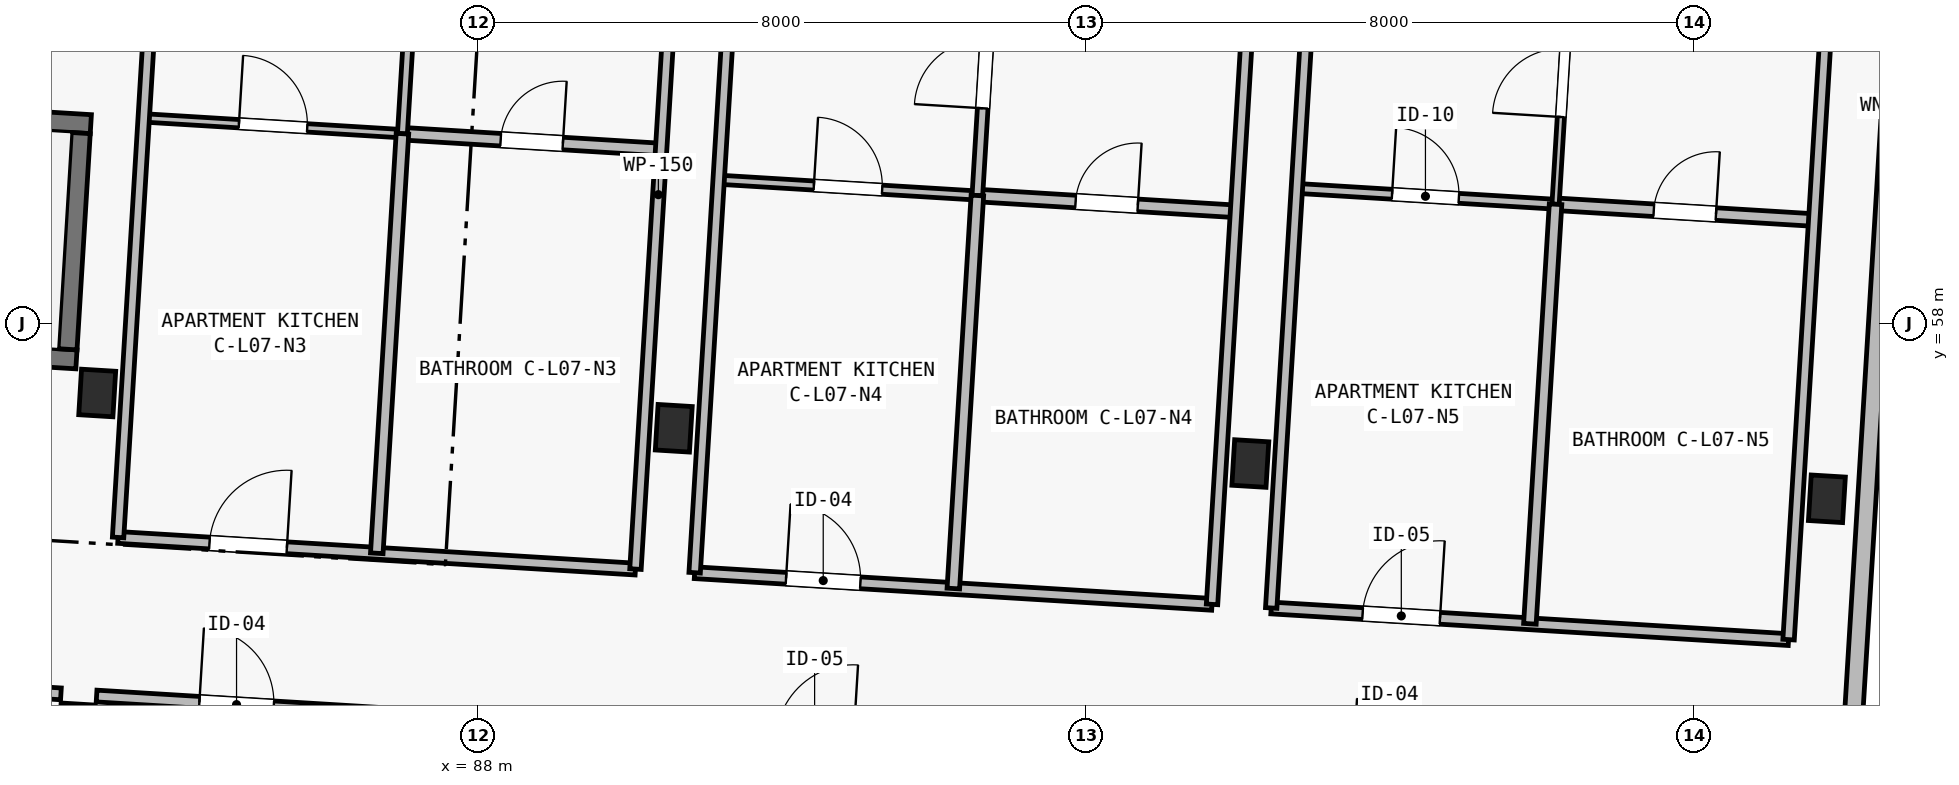
"""IFC4 building model, lengths in metres.
Left out: names, types, materials, properties, quantities, classifications, styles, units other than length and angle.
Written with IfcOpenShell. Run it as: python <this file> out.ifc"""

import sys

from ifc_helpers import new_model, si_unit, direction, frame, frame_2d, origin, origin_2d, place, context, subcontext, project, spatial, rectangle, extrude, element, fill, save


model = new_model("IFC4")
c1 = context("Model", 3, precision=1e-05, world=origin(), true_north=direction((0.0, 1.0)))
c2 = subcontext(c1, "Body", "Model", "MODEL_VIEW")
j1 = project(units=[si_unit("LENGTHUNIT", "METRE"), si_unit("PLANEANGLEUNIT", "RADIAN")], contexts=[c1])
p1 = place(None, origin())
s1 = spatial("IfcSite", under=j1, at=p1, CompositionType="ELEMENT")
p2 = place(p1, origin())
s2 = spatial("IfcBuilding", under=s1, at=p2, CompositionType="ELEMENT")
p3 = place(p2, frame((0.0, 0.0, 24.65)))
s3 = spatial("IfcBuildingStorey", under=s2, at=p3, CompositionType="ELEMENT", Elevation=24.65)
for number, where, z_axis, x_axis in (
    (1, (82.721, 52.694, 0.0), (0.0, 0.0, 1.0), (0.998, -0.061, 0.0)),
    (2, (82.99, 57.086, 0.0), (0.0, 0.0, 1.0), (0.998, -0.061, 0.0)),
    (3, (90.576, 56.622, 0.0), (0.0, 0.0, 1.0), (0.998, -0.061, 0.0)),
    (4, (98.162, 56.158, 0.0), (0.0, 0.0, 1.0), (0.998, -0.061, 0.0)),
):
    element("IfcColumn", number, at=place(p3, frame(where, z_axis=z_axis, x_axis=x_axis)), inside=s3, PredefinedType="COLUMN", context=c2, shape_type="SweptSolid", body=[
        extrude(rectangle(XDim=0.45, YDim=0.6, at=origin_2d()), origin(), (0.0, 0.0, 1.0), 3.25),
    ])
p4 = place(p3, frame((105.748, 55.694, 0.0), z_axis=(0.0, 0.0, 1.0), x_axis=(0.998134798422, -0.061048539535, 0.0)))
e5 = element("IfcColumn", 5, at=p4, inside=s3, PredefinedType="COLUMN", context=c2, shape_type="SweptSolid", body=[
    extrude(rectangle(XDim=0.45, YDim=0.6, at=origin_2d()), origin(), (0.0, 0.0, 1.0), 4.701),
])
p5 = place(p3, frame((75.919, 61.05, 0.0), z_axis=(0.0, 0.0, 1.0), x_axis=(0.998135546153, -0.061036313012, 0.0)))
e6 = element("IfcWall", 6, at=p5, inside=s3, PredefinedType="SHEAR", context=c2, shape_type="SweptSolid", body=[
    extrude(rectangle(XDim=7.0, YDim=0.25, at=frame_2d((3.5, 0.0))), origin(), (0.0, 0.0, 1.0), 3.25),
])
p6 = place(p5, frame((0.45, 0.0, 0.0)))
e7 = element("IfcOpeningElement", 7, at=p6, cuts=e6, PredefinedType="OPENING", context=c2, shape_type="SweptSolid", body=[
    extrude(rectangle(XDim=0.9, YDim=2.1, at=frame_2d((0.45, 1.05))), frame((0.0, 0.14, 0.0), z_axis=(0.0, -1.0, 0.0), x_axis=(1.0, 0.0, 0.0)), (0.0, 0.0, 1.0), 0.28),
])
p7 = place(p3, frame((75.73, 57.956, 0.0), z_axis=(0.0, 0.0, 1.0), x_axis=(0.998135546153, -0.061036313012, 0.0)))
e8 = element("IfcWall", 8, at=p7, inside=s3, PredefinedType="SHEAR", context=c2, shape_type="SweptSolid", body=[
    extrude(rectangle(XDim=7.0, YDim=0.25, at=frame_2d((3.5, 0.0))), origin(), (0.0, 0.0, 1.0), 3.25),
])
p8 = place(p7, frame((0.45, 0.0, 0.0)))
e9 = element("IfcOpeningElement", 9, at=p8, cuts=e8, PredefinedType="OPENING", context=c2, shape_type="SweptSolid", body=[
    extrude(rectangle(XDim=1.05, YDim=2.15, at=frame_2d((0.525, 1.075))), frame((0.0, 0.14, 0.0), z_axis=(0.0, -1.0, 0.0), x_axis=(1.0, 0.0, 0.0)), (0.0, 0.0, 1.0), 0.28),
])
p9 = place(p3, frame((82.599, 57.661, 0.0), z_axis=(0.0, 0.0, 1.0), x_axis=(0.06107697143, 0.998133059046, 0.0)))
e10 = element("IfcWall", 10, at=p9, inside=s3, PredefinedType="SHEAR", context=c2, shape_type="SweptSolid", body=[
    extrude(rectangle(XDim=2.85, YDim=0.25, at=frame_2d((1.425, 0.0))), origin(), (0.0, 0.0, 1.0), 3.25),
])
p10 = place(p3, frame((106.768, 63.771, 0.0), z_axis=(0.0, 0.0, 1.0), x_axis=(-0.061053332998, -0.99813450523, 0.0)))
e11 = element("IfcWall", 11, at=p10, inside=s3, PredefinedType="SOLIDWALL", context=c2, shape_type="SweptSolid", body=[
    extrude(rectangle(XDim=20.65, YDim=0.24, at=frame_2d((10.325, 0.0))), origin(), (0.0, 0.0, 1.0), 5.085),
])
p11 = place(p10, frame((2.99, 0.0, 0.52)))
e12 = element("IfcOpeningElement", 12, at=p11, cuts=e11, PredefinedType="OPENING", context=c2, shape_type="SweptSolid", body=[
    extrude(rectangle(XDim=0.6, YDim=2.22, at=frame_2d((0.3, 1.11))), frame((0.0, 0.135, 0.0), z_axis=(0.0, -1.0, 0.0), x_axis=(1.0, 0.0, 0.0)), (0.0, 0.0, 1.0), 0.27),
])
p12 = place(p10, frame((17.28, 0.0, 0.45)))
e13 = element("IfcOpeningElement", 13, at=p12, cuts=e11, PredefinedType="OPENING", context=c2, shape_type="SweptSolid", body=[
    extrude(rectangle(XDim=0.74, YDim=2.26, at=frame_2d((0.37, 1.13))), frame((0.0, 0.135, 0.0), z_axis=(0.0, -1.0, 0.0), x_axis=(1.0, 0.0, 0.0)), (0.0, 0.0, 1.0), 0.27),
])
p13 = place(p3, frame((78.415, 53.378, 0.0), z_axis=(0.0, 0.0, 1.0), x_axis=(0.998132736029, -0.061082250024, 0.0)))
e14 = element("IfcWall", 14, at=p13, inside=s3, PredefinedType="PARTITIONING", context=c2, shape_type="SweptSolid", body=[
    extrude(rectangle(XDim=4.105, YDim=0.155, at=frame_2d((2.052, 0.0))), origin(), (0.0, 0.0, 1.0), 2.97),
])
p14 = place(p13, frame((0.457, 0.0, 0.0)))
e15 = element("IfcOpeningElement", 15, at=p14, cuts=e14, PredefinedType="OPENING", context=c2, shape_type="SweptSolid", body=[
    extrude(rectangle(XDim=1.02, YDim=2.2, at=frame_2d((0.51, 1.1))), frame((0.0, 0.093, 0.0), z_axis=(0.0, -1.0, 0.0), x_axis=(1.0, 0.0, 0.0)), (0.0, 0.0, 1.0), 0.185),
])
p15 = place(p3, frame((82.982, 53.099, 0.0), z_axis=(0.0, 0.0, 1.0), x_axis=(0.998134569689, -0.061052279168, 0.0)))
e16 = element("IfcWall", 16, at=p15, inside=s3, PredefinedType="PARTITIONING", context=c2, shape_type="SweptSolid", body=[
    extrude(rectangle(XDim=7.13, YDim=0.155, at=frame_2d((3.565, 0.0))), origin(), (0.0, 0.0, 1.0), 2.97),
])
p16 = place(p15, frame((1.355, 0.0, 0.0)))
e17 = element("IfcOpeningElement", 17, at=p16, cuts=e16, PredefinedType="OPENING", context=c2, shape_type="SweptSolid", body=[
    extrude(rectangle(XDim=0.98, YDim=2.15, at=frame_2d((0.49, 1.075))), frame((0.0, 0.093, 0.0), z_axis=(0.0, -1.0, 0.0), x_axis=(1.0, 0.0, 0.0)), (0.0, 0.0, 1.0), 0.185),
])
p17 = place(p3, frame((83.265, 55.185, 0.0), z_axis=(0.0, 0.0, 1.0), x_axis=(0.998135531673, -0.061036549799, 0.0)))
e18 = element("IfcWall", 18, at=p17, inside=s3, PredefinedType="PARTITIONING", context=c2, shape_type="SweptSolid", body=[
    extrude(rectangle(XDim=6.82, YDim=0.155, at=frame_2d((3.41, 0.0))), origin(), (0.0, 0.0, 1.0), 2.97),
])
p18 = place(p17, frame((1.205, 0.0, 0.0)))
e19 = element("IfcOpeningElement", 19, at=p18, cuts=e18, PredefinedType="OPENING", context=c2, shape_type="SweptSolid", body=[
    extrude(rectangle(XDim=1.02, YDim=2.2, at=frame_2d((0.51, 1.1))), frame((0.0, 0.093, 0.0), z_axis=(0.0, -1.0, 0.0), x_axis=(1.0, 0.0, 0.0)), (0.0, 0.0, 1.0), 0.185),
])
p19 = place(p3, frame((83.602, 60.705, 0.0), z_axis=(0.0, 0.0, 1.0), x_axis=(0.998133617109, -0.061067850767, 0.0)))
e20 = element("IfcWall", 20, at=p19, inside=s3, PredefinedType="PARTITIONING", context=c2, shape_type="SweptSolid", body=[
    extrude(rectangle(XDim=3.41, YDim=0.11, at=frame_2d((1.705, 0.0))), origin(), (0.0, 0.0, 1.0), 2.97),
])
p20 = place(p19, frame((1.255, 0.0, 0.0)))
e21 = element("IfcOpeningElement", 21, at=p20, cuts=e20, PredefinedType="OPENING", context=c2, shape_type="SweptSolid", body=[
    extrude(rectangle(XDim=0.9, YDim=2.1, at=frame_2d((0.45, 1.05))), frame((0.0, 0.07, 0.0), z_axis=(0.0, -1.0, 0.0), x_axis=(1.0, 0.0, 0.0)), (0.0, 0.0, 1.0), 0.14),
])
p21 = place(p3, frame((87.006, 60.497, 0.0), z_axis=(0.0, 0.0, 1.0), x_axis=(0.998137711988, -0.061000884486, 0.0)))
e22 = element("IfcWall", 22, at=p21, inside=s3, PredefinedType="PLUMBINGWALL", context=c2, shape_type="SweptSolid", body=[
    extrude(rectangle(XDim=3.41, YDim=0.165, at=frame_2d((1.705, 0.0))), origin(), (0.0, 0.0, 1.0), 2.97),
])
p22 = place(p21, frame((1.295, 0.0, 0.0)))
e23 = element("IfcOpeningElement", 23, at=p22, cuts=e22, PredefinedType="OPENING", context=c2, shape_type="SweptSolid", body=[
    extrude(rectangle(XDim=0.82, YDim=2.08, at=frame_2d((0.41, 1.04))), frame((0.0, 0.097, 0.0), z_axis=(0.0, -1.0, 0.0), x_axis=(1.0, 0.0, 0.0)), (0.0, 0.0, 1.0), 0.195),
])
p23 = place(p3, frame((87.006, 60.497, 0.0), z_axis=(0.0, 0.0, 1.0), x_axis=(0.06103343432, 0.998135722182, 0.0)))
e24 = element("IfcWall", 24, at=p23, inside=s3, PredefinedType="PARTITIONING", context=c2, shape_type="SweptSolid", body=[
    extrude(rectangle(XDim=4.34, YDim=0.13, at=frame_2d((2.17, 0.0))), origin(), (0.0, 0.0, 1.0), 2.97),
])
p24 = place(p23, frame((1.15, 0.0, 0.0)))
e25 = element("IfcOpeningElement", 25, at=p24, cuts=e24, PredefinedType="OPENING", context=c2, shape_type="SweptSolid", body=[
    extrude(rectangle(XDim=0.88, YDim=2.1, at=frame_2d((0.44, 1.05))), frame((0.0, 0.08, 0.0), z_axis=(0.0, -1.0, 0.0), x_axis=(1.0, 0.0, 0.0)), (0.0, 0.0, 1.0), 0.16),
])
p25 = place(p3, frame((86.668, 54.977, 0.0), z_axis=(0.0, 0.0, 1.0), x_axis=(0.061058897293, 0.99813416486, 0.0)))
e26 = element("IfcWall", 26, at=p25, inside=s3, PredefinedType="PLUMBINGWALL", context=c2, shape_type="SweptSolid", body=[
    extrude(rectangle(XDim=5.53, YDim=0.165, at=frame_2d((2.765, 0.0))), origin(), (0.0, 0.0, 1.0), 2.97),
])
p26 = place(p3, frame((83.265, 55.185, 0.0), z_axis=(0.0, 0.0, 1.0), x_axis=(0.061046193261, 0.998134941923, 0.0)))
e27 = element("IfcWall", 27, at=p26, inside=s3, PredefinedType="PARTITIONING", context=c2, shape_type="SweptSolid", body=[
    extrude(rectangle(XDim=9.87, YDim=0.15, at=frame_2d((4.935, 0.0))), origin(), (0.0, 0.0, 1.0), 2.97),
])
p27 = place(p3, frame((90.072, 54.769, 0.0), z_axis=(0.0, 0.0, 1.0), x_axis=(0.061047700465, 0.998134849741, 0.0)))
e28 = element("IfcWall", 28, at=p27, inside=s3, PredefinedType="PARTITIONING", context=c2, shape_type="SweptSolid", body=[
    extrude(rectangle(XDim=9.87, YDim=0.15, at=frame_2d((4.935, 0.0))), origin(), (0.0, 0.0, 1.0), 2.97),
])
p28 = place(p3, frame((90.85, 54.721, 0.0), z_axis=(0.0, 0.0, 1.0), x_axis=(0.998135665032, -0.06103436893, 0.0)))
e29 = element("IfcWall", 29, at=p28, inside=s3, PredefinedType="PARTITIONING", context=c2, shape_type="SweptSolid", body=[
    extrude(rectangle(XDim=6.82, YDim=0.155, at=frame_2d((3.41, 0.0))), origin(), (0.0, 0.0, 1.0), 2.97),
])
p29 = place(p28, frame((1.205, 0.0, 0.0)))
e30 = element("IfcOpeningElement", 30, at=p29, cuts=e29, PredefinedType="OPENING", context=c2, shape_type="SweptSolid", body=[
    extrude(rectangle(XDim=0.98, YDim=2.15, at=frame_2d((0.49, 1.075))), frame((0.0, 0.093, 0.0), z_axis=(0.0, -1.0, 0.0), x_axis=(1.0, 0.0, 0.0)), (0.0, 0.0, 1.0), 0.185),
])
p30 = place(p3, frame((91.167, 59.892, 0.0), z_axis=(0.0, 0.0, 1.0), x_axis=(0.998133617109, -0.061067850767, 0.0)))
e31 = element("IfcWall", 31, at=p30, inside=s3, PredefinedType="PARTITIONING", context=c2, shape_type="SweptSolid", body=[
    extrude(rectangle(XDim=3.41, YDim=0.12, at=frame_2d((1.705, 0.0))), origin(), (0.0, 0.0, 1.0), 2.97),
])
p31 = place(p30, frame((1.255, 0.0, 0.0)))
e32 = element("IfcOpeningElement", 32, at=p31, cuts=e31, PredefinedType="OPENING", context=c2, shape_type="SweptSolid", body=[
    extrude(rectangle(XDim=0.9, YDim=2.1, at=frame_2d((0.45, 1.05))), frame((0.0, 0.075, 0.0), z_axis=(0.0, -1.0, 0.0), x_axis=(1.0, 0.0, 0.0)), (0.0, 0.0, 1.0), 0.15),
])
p32 = place(p3, frame((94.57, 59.684, 0.0), z_axis=(0.0, 0.0, 1.0), x_axis=(0.998133350094, -0.061072214879, 0.0)))
e33 = element("IfcWall", 33, at=p32, inside=s3, PredefinedType="PLUMBINGWALL", context=c2, shape_type="SweptSolid", body=[
    extrude(rectangle(XDim=3.41, YDim=0.165, at=frame_2d((1.705, 0.0))), origin(), (0.0, 0.0, 1.0), 2.97),
])
p33 = place(p32, frame((1.295, 0.0, 0.0)))
e34 = element("IfcOpeningElement", 34, at=p33, cuts=e33, PredefinedType="OPENING", context=c2, shape_type="SweptSolid", body=[
    extrude(rectangle(XDim=0.82, YDim=2.08, at=frame_2d((0.41, 1.04))), frame((0.0, 0.097, 0.0), z_axis=(0.0, -1.0, 0.0), x_axis=(1.0, 0.0, 0.0)), (0.0, 0.0, 1.0), 0.195),
])
p34 = place(p3, frame((94.57, 59.684, 0.0), z_axis=(0.0, 0.0, 1.0), x_axis=(0.061062434628, 0.998133948465, 0.0)))
e35 = element("IfcWall", 35, at=p34, inside=s3, PredefinedType="PARTITIONING", context=c2, shape_type="SweptSolid", body=[
    extrude(rectangle(XDim=4.69, YDim=0.14, at=frame_2d((2.345, 0.0))), origin(), (0.0, 0.0, 1.0), 2.97),
])
p35 = place(p34, frame((1.15, 0.0, 0.0)))
e36 = element("IfcOpeningElement", 36, at=p35, cuts=e35, PredefinedType="OPENING", context=c2, shape_type="SweptSolid", body=[
    extrude(rectangle(XDim=0.9, YDim=2.1, at=frame_2d((0.45, 1.05))), frame((0.0, 0.085, 0.0), z_axis=(0.0, -1.0, 0.0), x_axis=(1.0, 0.0, 0.0)), (0.0, 0.0, 1.0), 0.17),
])
p36 = place(p3, frame((94.254, 54.513, 0.0), z_axis=(0.0, 0.0, 1.0), x_axis=(0.061081315517, 0.998132793217, 0.0)))
e37 = element("IfcWall", 37, at=p36, inside=s3, PredefinedType="PLUMBINGWALL", context=c2, shape_type="SweptSolid", body=[
    extrude(rectangle(XDim=5.18, YDim=0.165, at=frame_2d((2.59, 0.0))), origin(), (0.0, 0.0, 1.0), 2.97),
])
for number, where, z_axis, x_axis in (
    (38, (90.85, 54.721, 0.0), (0.0, 0.0, 1.0), (0.061, 0.998, 0.0)),
    (39, (97.658, 54.305, 0.0), (0.0, 0.0, 1.0), (0.061, 0.998, 0.0)),
):
    element("IfcWall", number, at=place(p3, frame(where, z_axis=z_axis, x_axis=x_axis)), inside=s3, PredefinedType="PARTITIONING", context=c2, shape_type="SweptSolid", body=[
        extrude(rectangle(XDim=9.87, YDim=0.15, at=frame_2d((4.935, 0.0))), origin(), (0.0, 0.0, 1.0), 2.97),
    ])
p37 = place(p3, frame((98.436, 54.258, 0.0), z_axis=(0.0, 0.0, 1.0), x_axis=(0.998133350094, -0.061072214879, 0.0)))
e40 = element("IfcWall", 40, at=p37, inside=s3, PredefinedType="PARTITIONING", context=c2, shape_type="SweptSolid", body=[
    extrude(rectangle(XDim=6.82, YDim=0.155, at=frame_2d((3.41, 0.0))), origin(), (0.0, 0.0, 1.0), 2.97),
])
p38 = place(p37, frame((1.205, 0.0, 0.0)))
e41 = element("IfcOpeningElement", 41, at=p38, cuts=e40, PredefinedType="OPENING", context=c2, shape_type="SweptSolid", body=[
    extrude(rectangle(XDim=1.02, YDim=2.2, at=frame_2d((0.51, 1.1))), frame((0.0, 0.093, 0.0), z_axis=(0.0, -1.0, 0.0), x_axis=(1.0, 0.0, 0.0)), (0.0, 0.0, 1.0), 0.185),
])
p39 = place(p3, frame((98.774, 59.777, 0.0), z_axis=(0.0, 0.0, 1.0), x_axis=(0.998137711988, -0.061000884486, 0.0)))
e42 = element("IfcWall", 42, at=p39, inside=s3, PredefinedType="PARTITIONING", context=c2, shape_type="SweptSolid", body=[
    extrude(rectangle(XDim=3.41, YDim=0.13, at=frame_2d((1.705, 0.0))), origin(), (0.0, 0.0, 1.0), 2.97),
])
p40 = place(p39, frame((1.255, 0.0, 0.0)))
e43 = element("IfcOpeningElement", 43, at=p40, cuts=e42, PredefinedType="OPENING", context=c2, shape_type="SweptSolid", body=[
    extrude(rectangle(XDim=0.88, YDim=2.1, at=frame_2d((0.44, 1.05))), frame((0.0, 0.08, 0.0), z_axis=(0.0, -1.0, 0.0), x_axis=(1.0, 0.0, 0.0)), (0.0, 0.0, 1.0), 0.16),
])
p41 = place(p3, frame((102.177, 59.569, 0.0), z_axis=(0.0, 0.0, 1.0), x_axis=(0.998133350094, -0.061072214879, 0.0)))
e44 = element("IfcWall", 44, at=p41, inside=s3, PredefinedType="PLUMBINGWALL", context=c2, shape_type="SweptSolid", body=[
    extrude(rectangle(XDim=3.41, YDim=0.165, at=frame_2d((1.705, 0.0))), origin(), (0.0, 0.0, 1.0), 2.97),
])
p42 = place(p41, frame((1.295, 0.0, 0.0)))
e45 = element("IfcOpeningElement", 45, at=p42, cuts=e44, PredefinedType="OPENING", context=c2, shape_type="SweptSolid", body=[
    extrude(rectangle(XDim=0.82, YDim=2.08, at=frame_2d((0.41, 1.04))), frame((0.0, 0.097, 0.0), z_axis=(0.0, -1.0, 0.0), x_axis=(1.0, 0.0, 0.0)), (0.0, 0.0, 1.0), 0.195),
])
p43 = place(p3, frame((102.177, 59.569, 0.0), z_axis=(0.0, 0.0, 1.0), x_axis=(0.061036861365, 0.998135512621, 0.0)))
e46 = element("IfcWall", 46, at=p43, inside=s3, PredefinedType="PARTITIONING", context=c2, shape_type="SweptSolid", body=[
    extrude(rectangle(XDim=4.34, YDim=0.095, at=frame_2d((2.17, 0.0))), origin(), (0.0, 0.0, 1.0), 2.97),
])
p44 = place(p43, frame((1.15, 0.0, 0.0)))
e47 = element("IfcOpeningElement", 47, at=p44, cuts=e46, PredefinedType="OPENING", context=c2, shape_type="SweptSolid", body=[
    extrude(rectangle(XDim=0.9, YDim=2.1, at=frame_2d((0.45, 1.05))), frame((0.0, 0.062, 0.0), z_axis=(0.0, -1.0, 0.0), x_axis=(1.0, 0.0, 0.0)), (0.0, 0.0, 1.0), 0.125),
])
p45 = place(p3, frame((101.84, 54.049, 0.0), z_axis=(0.0, 0.0, 1.0), x_axis=(0.061056206715, 0.998134329447, 0.0)))
e48 = element("IfcWall", 48, at=p45, inside=s3, PredefinedType="PLUMBINGWALL", context=c2, shape_type="SweptSolid", body=[
    extrude(rectangle(XDim=5.53, YDim=0.165, at=frame_2d((2.765, 0.0))), origin(), (0.0, 0.0, 1.0), 2.97),
])
for number, where, z_axis, x_axis in (
    (49, (98.436, 54.258, 0.0), (0.0, 0.0, 1.0), (0.061, 0.998, 0.0)),
    (50, (105.243, 53.841, 0.0), (0.0, 0.0, 1.0), (0.061, 0.998, 0.0)),
):
    element("IfcWall", number, at=place(p3, frame(where, z_axis=z_axis, x_axis=x_axis)), inside=s3, PredefinedType="PARTITIONING", context=c2, shape_type="SweptSolid", body=[
        extrude(rectangle(XDim=9.87, YDim=0.15, at=frame_2d((4.935, 0.0))), origin(), (0.0, 0.0, 1.0), 2.97),
    ])
p46 = place(p16, origin())
e51 = element("IfcDoor", 51, at=p46, inside=s3, OperationType="SINGLE_SWING_LEFT", PredefinedType="DOOR", context=c2, shape_type="SweptSolid", body=[
    extrude(rectangle(XDim=0.98, YDim=2.15, at=frame_2d((0.49, 1.075))), frame((0.0, 0.025, 0.0), z_axis=(0.0, -1.0, 0.0), x_axis=(1.0, 0.0, 0.0)), (0.0, 0.0, 1.0), 0.05),
])
fill(e17, e51)
p47 = place(p18, origin())
e52 = element("IfcDoor", 52, at=p47, inside=s3, OperationType="SINGLE_SWING_RIGHT", PredefinedType="DOOR", context=c2, shape_type="SweptSolid", body=[
    extrude(rectangle(XDim=1.02, YDim=2.2, at=frame_2d((0.51, 1.1))), frame((0.0, 0.025, 0.0), z_axis=(0.0, -1.0, 0.0), x_axis=(1.0, 0.0, 0.0)), (0.0, 0.0, 1.0), 0.05),
])
fill(e19, e52)
p48 = place(p20, origin())
e53 = element("IfcDoor", 53, at=p48, inside=s3, OperationType="SINGLE_SWING_LEFT", PredefinedType="DOOR", context=c2, shape_type="SweptSolid", body=[
    extrude(rectangle(XDim=0.9, YDim=2.1, at=frame_2d((0.45, 1.05))), frame((0.0, 0.025, 0.0), z_axis=(0.0, -1.0, 0.0), x_axis=(1.0, 0.0, 0.0)), (0.0, 0.0, 1.0), 0.05),
])
fill(e21, e53)
p49 = place(p22, origin())
e54 = element("IfcDoor", 54, at=p49, inside=s3, OperationType="SINGLE_SWING_RIGHT", PredefinedType="DOOR", context=c2, shape_type="SweptSolid", body=[
    extrude(rectangle(XDim=0.82, YDim=2.08, at=frame_2d((0.41, 1.04))), frame((0.0, 0.025, 0.0), z_axis=(0.0, -1.0, 0.0), x_axis=(1.0, 0.0, 0.0)), (0.0, 0.0, 1.0), 0.05),
])
fill(e23, e54)
p50 = place(p29, origin())
e55 = element("IfcDoor", 55, at=p50, inside=s3, OperationType="SINGLE_SWING_LEFT", PredefinedType="DOOR", context=c2, shape_type="SweptSolid", body=[
    extrude(rectangle(XDim=0.98, YDim=2.15, at=frame_2d((0.49, 1.075))), frame((0.0, 0.025, 0.0), z_axis=(0.0, -1.0, 0.0), x_axis=(1.0, 0.0, 0.0)), (0.0, 0.0, 1.0), 0.05),
])
fill(e30, e55)
p51 = place(p31, origin())
e56 = element("IfcDoor", 56, at=p51, inside=s3, OperationType="SINGLE_SWING_LEFT", PredefinedType="DOOR", context=c2, shape_type="SweptSolid", body=[
    extrude(rectangle(XDim=0.9, YDim=2.1, at=frame_2d((0.45, 1.05))), frame((0.0, 0.025, 0.0), z_axis=(0.0, -1.0, 0.0), x_axis=(1.0, 0.0, 0.0)), (0.0, 0.0, 1.0), 0.05),
])
fill(e32, e56)
p52 = place(p33, origin())
e57 = element("IfcDoor", 57, at=p52, inside=s3, OperationType="SINGLE_SWING_RIGHT", PredefinedType="DOOR", context=c2, shape_type="SweptSolid", body=[
    extrude(rectangle(XDim=0.82, YDim=2.08, at=frame_2d((0.41, 1.04))), frame((0.0, 0.025, 0.0), z_axis=(0.0, -1.0, 0.0), x_axis=(1.0, 0.0, 0.0)), (0.0, 0.0, 1.0), 0.05),
])
fill(e34, e57)
p53 = place(p35, origin())
e58 = element("IfcDoor", 58, at=p53, inside=s3, OperationType="SINGLE_SWING_LEFT", PredefinedType="DOOR", context=c2, shape_type="SweptSolid", body=[
    extrude(rectangle(XDim=0.9, YDim=2.1, at=frame_2d((0.45, 1.05))), frame((0.0, 0.025, 0.0), z_axis=(0.0, -1.0, 0.0), x_axis=(1.0, 0.0, 0.0)), (0.0, 0.0, 1.0), 0.05),
])
fill(e36, e58)
p54 = place(p38, origin())
e59 = element("IfcDoor", 59, at=p54, inside=s3, OperationType="SINGLE_SWING_RIGHT", PredefinedType="DOOR", context=c2, shape_type="SweptSolid", body=[
    extrude(rectangle(XDim=1.02, YDim=2.2, at=frame_2d((0.51, 1.1))), frame((0.0, 0.025, 0.0), z_axis=(0.0, -1.0, 0.0), x_axis=(1.0, 0.0, 0.0)), (0.0, 0.0, 1.0), 0.05),
])
fill(e41, e59)
p55 = place(p40, origin())
e60 = element("IfcDoor", 60, at=p55, inside=s3, OperationType="SINGLE_SWING_LEFT", PredefinedType="DOOR", context=c2, shape_type="SweptSolid", body=[
    extrude(rectangle(XDim=0.88, YDim=2.1, at=frame_2d((0.44, 1.05))), frame((0.0, 0.025, 0.0), z_axis=(0.0, -1.0, 0.0), x_axis=(1.0, 0.0, 0.0)), (0.0, 0.0, 1.0), 0.05),
])
fill(e43, e60)
p56 = place(p42, origin())
e61 = element("IfcDoor", 61, at=p56, inside=s3, OperationType="SINGLE_SWING_RIGHT", PredefinedType="DOOR", context=c2, shape_type="SweptSolid", body=[
    extrude(rectangle(XDim=0.82, YDim=2.08, at=frame_2d((0.41, 1.04))), frame((0.0, 0.025, 0.0), z_axis=(0.0, -1.0, 0.0), x_axis=(1.0, 0.0, 0.0)), (0.0, 0.0, 1.0), 0.05),
])
fill(e45, e61)
p57 = place(p44, origin())
e62 = element("IfcDoor", 62, at=p57, inside=s3, OperationType="SINGLE_SWING_LEFT", PredefinedType="DOOR", context=c2, shape_type="SweptSolid", body=[
    extrude(rectangle(XDim=0.9, YDim=2.1, at=frame_2d((0.45, 1.05))), frame((0.0, 0.025, 0.0), z_axis=(0.0, -1.0, 0.0), x_axis=(1.0, 0.0, 0.0)), (0.0, 0.0, 1.0), 0.05),
])
fill(e47, e62)
save(model, sys.argv[1])
